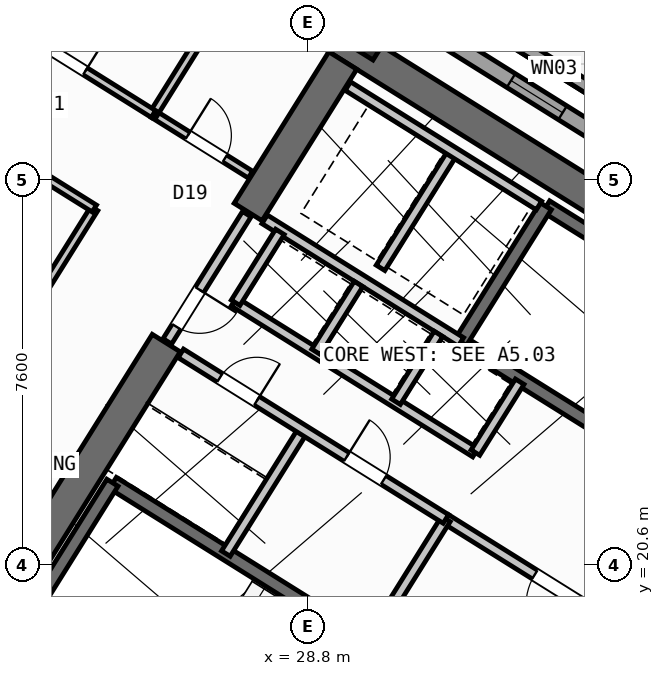
"""IFC4 building model, lengths in metres.
Left out: names, types, materials, properties, quantities, classifications, styles, units other than length and angle.
Written with IfcOpenShell. Run it as: python <this file> out.ifc"""

import sys

from ifc_helpers import new_model, si_unit, direction, frame, frame_2d, origin, origin_2d, place, context, subcontext, project, spatial, rectangle, hollow_rectangle, extrude, source, transform, mapped, element, fill, save


model = new_model("IFC4")
c1 = context("Model", 3, precision=1e-05, world=origin(), true_north=direction((0.0, 1.0)))
c2 = subcontext(c1, "Body", "Model", "MODEL_VIEW")
j1 = project(units=[si_unit("LENGTHUNIT", "METRE"), si_unit("PLANEANGLEUNIT", "RADIAN")], contexts=[c1])
p1 = place(None, origin())
s1 = spatial("IfcSite", under=j1, at=p1, CompositionType="ELEMENT")
p2 = place(p1, origin())
s2 = spatial("IfcBuilding", under=s1, at=p2, CompositionType="ELEMENT")
p3 = place(p2, frame((0.0, 0.0, 24.0)))
s3 = spatial("IfcBuildingStorey", under=s2, at=p3, CompositionType="ELEMENT", Elevation=24.0)
p4 = place(p3, frame((40.615, 23.983, 0.0), z_axis=(0.0, 0.0, 1.0), x_axis=(-0.848045953968, 0.529922692436, 0.0)))
e1 = element("IfcWall", 1, at=p4, inside=s3, PredefinedType="SHEAR", context=c2, shape_type="SweptSolid", body=[
    extrude(rectangle(XDim=13.24, YDim=0.65, at=frame_2d((6.62, 0.0))), origin(), (0.0, 0.0, 1.0), 3.35),
])
p5 = place(p3, frame((29.491, 30.552, 0.0), z_axis=(0.0, 0.0, 1.0), x_axis=(-0.529893103397, -0.8480644427, 0.0)))
e2 = element("IfcWall", 2, at=p5, inside=s3, PredefinedType="SHEAR", context=c2, shape_type="SweptSolid", body=[
    extrude(rectangle(XDim=3.525, YDim=0.65, at=frame_2d((1.763, 0.0))), origin(), (0.0, 0.0, 1.0), 3.35),
])
p6 = place(p3, frame((26.007, 24.976, 0.0), z_axis=(0.0, 0.0, 1.0), x_axis=(-0.529916319127, -0.848049936456, 0.0)))
e3 = element("IfcWall", 3, at=p6, inside=s3, PredefinedType="SHEAR", context=c2, shape_type="SweptSolid", body=[
    extrude(rectangle(XDim=6.375, YDim=0.65, at=frame_2d((3.188, 0.0))), origin(), (0.0, 0.0, 1.0), 3.35),
])
m1 = source(origin(), c2, "Body", "SweptSolid", [
    extrude(hollow_rectangle(XDim=1.0, YDim=1.0, WallThickness=0.04, at=origin_2d()), origin(), (0.0, 0.0, 1.0), 3.6),
])
p7 = place(p3, frame((29.928, 31.251, 0.0), z_axis=(0.0, 0.0, 1.0), x_axis=(-0.848048096156, 0.529919264233, 0.0)))
e4 = element("IfcColumn", 4, at=p7, inside=s3, PredefinedType="COLUMN", context=c2, shape_type="MappedRepresentation", body=[
    mapped(m1, transform((0.0, 0.0, 0.0), scale=1.0)),
])
p8 = place(p3, frame((40.961, 25.878, 0.0), z_axis=(0.0, 0.0, 1.0), x_axis=(-0.848053997745, 0.5299098196, 0.0)))
e5 = element("IfcWall", 5, at=p8, inside=s3, PredefinedType="PARAPET", context=c2, shape_type="SweptSolid", body=[
    extrude(rectangle(XDim=11.574, YDim=0.24, at=frame_2d((5.787, 0.0))), origin(), (0.0, 0.0, 1.0), 1.15),
])
p9 = place(p3, frame((29.268, 6.429, 0.0), z_axis=(0.0, 0.0, 1.0), x_axis=(-0.848049971435, 0.529916263149, 0.0)))
e6 = element("IfcWall", 6, at=p9, inside=s3, PredefinedType="STANDARD", context=c2, shape_type="SweptSolid", body=[
    extrude(rectangle(XDim=31.588, YDim=0.32, at=frame_2d((15.794, 0.0))), origin(), (0.0, 0.0, 1.0), 3.35),
])
p10 = place(p9, frame((15.901, 0.0, 0.0)))
e7 = element("IfcOpeningElement", 7, at=p10, cuts=e6, PredefinedType="OPENING", context=c2, shape_type="SweptSolid", body=[
    extrude(rectangle(XDim=1.2, YDim=2.15, at=frame_2d((0.6, 1.075))), frame((0.0, 0.17, 0.0), z_axis=(0.0, -1.0, 0.0), x_axis=(1.0, 0.0, 0.0)), (0.0, 0.0, 1.0), 0.34),
])
p11 = place(p9, frame((2.806, 0.0, 0.8)))
e8 = element("IfcOpeningElement", 8, at=p11, cuts=e6, PredefinedType="OPENING", context=c2, shape_type="SweptSolid", body=[
    extrude(rectangle(XDim=2.1, YDim=1.55, at=frame_2d((1.05, 0.775))), frame((0.0, 0.17, 0.0), z_axis=(0.0, -1.0, 0.0), x_axis=(1.0, 0.0, 0.0)), (0.0, 0.0, 1.0), 0.34),
])
p12 = place(p9, frame((7.481, 0.0, 0.8)))
e9 = element("IfcOpeningElement", 9, at=p12, cuts=e6, PredefinedType="OPENING", context=c2, shape_type="SweptSolid", body=[
    extrude(rectangle(XDim=2.1, YDim=1.55, at=frame_2d((1.05, 0.775))), frame((0.0, 0.17, 0.0), z_axis=(0.0, -1.0, 0.0), x_axis=(1.0, 0.0, 0.0)), (0.0, 0.0, 1.0), 0.34),
])
p13 = place(p9, frame((28.654, 0.0, 0.95)))
e10 = element("IfcOpeningElement", 10, at=p13, cuts=e6, PredefinedType="OPENING", context=c2, shape_type="SweptSolid", body=[
    extrude(rectangle(XDim=1.2, YDim=1.4, at=frame_2d((0.6, 0.7))), frame((0.0, 0.17, 0.0), z_axis=(0.0, -1.0, 0.0), x_axis=(1.0, 0.0, 0.0)), (0.0, 0.0, 1.0), 0.34),
])
p14 = place(p9, frame((19.11, 0.0, 1.0)))
e11 = element("IfcOpeningElement", 11, at=p14, cuts=e6, PredefinedType="OPENING", context=c2, shape_type="SweptSolid", body=[
    extrude(rectangle(XDim=0.9, YDim=1.25, at=frame_2d((0.45, 0.625))), frame((0.0, 0.17, 0.0), z_axis=(0.0, -1.0, 0.0), x_axis=(1.0, 0.0, 0.0)), (0.0, 0.0, 1.0), 0.34),
])
p15 = place(p9, frame((21.226, 0.0, 1.0)))
e12 = element("IfcOpeningElement", 12, at=p15, cuts=e6, PredefinedType="OPENING", context=c2, shape_type="SweptSolid", body=[
    extrude(rectangle(XDim=0.9, YDim=1.25, at=frame_2d((0.45, 0.625))), frame((0.0, 0.17, 0.0), z_axis=(0.0, -1.0, 0.0), x_axis=(1.0, 0.0, 0.0)), (0.0, 0.0, 1.0), 0.34),
])
p16 = place(p9, frame((23.014, 0.0, 1.0)))
e13 = element("IfcOpeningElement", 13, at=p16, cuts=e6, PredefinedType="OPENING", context=c2, shape_type="SweptSolid", body=[
    extrude(rectangle(XDim=0.9, YDim=1.25, at=frame_2d((0.45, 0.625))), frame((0.0, 0.17, 0.0), z_axis=(0.0, -1.0, 0.0), x_axis=(1.0, 0.0, 0.0)), (0.0, 0.0, 1.0), 0.34),
])
p17 = place(p9, frame((24.802, 0.0, 1.0)))
e14 = element("IfcOpeningElement", 14, at=p17, cuts=e6, PredefinedType="OPENING", context=c2, shape_type="SweptSolid", body=[
    extrude(rectangle(XDim=0.9, YDim=1.25, at=frame_2d((0.45, 0.625))), frame((0.0, 0.17, 0.0), z_axis=(0.0, -1.0, 0.0), x_axis=(1.0, 0.0, 0.0)), (0.0, 0.0, 1.0), 0.34),
])
p18 = place(p9, frame((26.59, 0.0, 1.0)))
e15 = element("IfcOpeningElement", 15, at=p18, cuts=e6, PredefinedType="OPENING", context=c2, shape_type="SweptSolid", body=[
    extrude(rectangle(XDim=0.9, YDim=1.25, at=frame_2d((0.45, 0.625))), frame((0.0, 0.17, 0.0), z_axis=(0.0, -1.0, 0.0), x_axis=(1.0, 0.0, 0.0)), (0.0, 0.0, 1.0), 0.34),
])
p19 = place(p3, frame((14.138, 41.825, 0.0), z_axis=(0.0, 0.0, 1.0), x_axis=(0.848046498049, -0.529921821731, 0.0)))
e16 = element("IfcWall", 16, at=p19, inside=s3, PredefinedType="STANDARD", context=c2, shape_type="SweptSolid", body=[
    extrude(rectangle(XDim=31.588, YDim=0.32, at=frame_2d((15.794, 0.0))), origin(), (0.0, 0.0, 1.0), 3.35),
])
p20 = place(p19, frame((3.369, 0.0, 0.0)))
e17 = element("IfcOpeningElement", 17, at=p20, cuts=e16, PredefinedType="OPENING", context=c2, shape_type="SweptSolid", body=[
    extrude(rectangle(XDim=1.05, YDim=2.15, at=frame_2d((0.525, 1.075))), frame((0.0, 0.17, 0.0), z_axis=(0.0, -1.0, 0.0), x_axis=(1.0, 0.0, 0.0)), (0.0, 0.0, 1.0), 0.34),
])
p21 = place(p19, frame((0.946, 0.0, 0.85)))
e18 = element("IfcOpeningElement", 18, at=p21, cuts=e16, PredefinedType="OPENING", context=c2, shape_type="SweptSolid", body=[
    extrude(rectangle(XDim=1.8, YDim=1.5, at=frame_2d((0.9, 0.75))), frame((0.0, 0.17, 0.0), z_axis=(0.0, -1.0, 0.0), x_axis=(1.0, 0.0, 0.0)), (0.0, 0.0, 1.0), 0.34),
])
p22 = place(p19, frame((8.46, 0.0, 0.85)))
e19 = element("IfcOpeningElement", 19, at=p22, cuts=e16, PredefinedType="OPENING", context=c2, shape_type="SweptSolid", body=[
    extrude(rectangle(XDim=1.8, YDim=1.5, at=frame_2d((0.9, 0.75))), frame((0.0, 0.17, 0.0), z_axis=(0.0, -1.0, 0.0), x_axis=(1.0, 0.0, 0.0)), (0.0, 0.0, 1.0), 0.34),
])
p23 = place(p19, frame((13.899, 0.0, 0.85)))
e20 = element("IfcOpeningElement", 20, at=p23, cuts=e16, PredefinedType="OPENING", context=c2, shape_type="SweptSolid", body=[
    extrude(rectangle(XDim=1.5, YDim=1.5, at=frame_2d((0.75, 0.75))), frame((0.0, 0.17, 0.0), z_axis=(0.0, -1.0, 0.0), x_axis=(1.0, 0.0, 0.0)), (0.0, 0.0, 1.0), 0.34),
])
p24 = place(p19, frame((22.019, 0.0, 0.95)))
e21 = element("IfcOpeningElement", 21, at=p24, cuts=e16, PredefinedType="OPENING", context=c2, shape_type="SweptSolid", body=[
    extrude(rectangle(XDim=1.2, YDim=1.4, at=frame_2d((0.6, 0.7))), frame((0.0, 0.17, 0.0), z_axis=(0.0, -1.0, 0.0), x_axis=(1.0, 0.0, 0.0)), (0.0, 0.0, 1.0), 0.34),
])
p25 = place(p19, frame((27.569, 0.0, 0.95)))
e22 = element("IfcOpeningElement", 22, at=p25, cuts=e16, PredefinedType="OPENING", context=c2, shape_type="SweptSolid", body=[
    extrude(rectangle(XDim=1.2, YDim=1.4, at=frame_2d((0.6, 0.7))), frame((0.0, 0.17, 0.0), z_axis=(0.0, -1.0, 0.0), x_axis=(1.0, 0.0, 0.0)), (0.0, 0.0, 1.0), 0.34),
])
p26 = place(p3, frame((31.28, 18.261, 0.0), z_axis=(0.0, 0.0, 1.0), x_axis=(-0.848051618787, 0.529913626805, 0.0)))
e23 = element("IfcWall", 23, at=p26, inside=s3, PredefinedType="SHEAR", context=c2, shape_type="SweptSolid", body=[
    extrude(rectangle(XDim=7.46, YDim=0.26, at=frame_2d((3.73, 0.0))), origin(), (0.0, 0.0, 1.0), 3.35),
])
p27 = place(p26, frame((0.36, 0.0, 0.0)))
e24 = element("IfcOpeningElement", 24, at=p27, cuts=e23, PredefinedType="OPENING", context=c2, shape_type="SweptSolid", body=[
    extrude(rectangle(XDim=0.86, YDim=2.05, at=frame_2d((0.43, 1.025))), frame((0.0, 0.14, 0.0), z_axis=(0.0, -1.0, 0.0), x_axis=(1.0, 0.0, 0.0)), (0.0, 0.0, 1.0), 0.28),
])
p28 = place(p3, frame((24.945, 22.22, 0.0), z_axis=(0.0, 0.0, 1.0), x_axis=(-0.529908658664, -0.84805472316, 0.0)))
e25 = element("IfcWall", 25, at=p28, inside=s3, PredefinedType="SHEAR", context=c2, shape_type="SweptSolid", body=[
    extrude(rectangle(XDim=3.16, YDim=0.26, at=frame_2d((1.58, 0.0))), origin(), (0.0, 0.0, 1.0), 3.35),
])
p29 = place(p3, frame((39.721, 23.788, 0.0), z_axis=(0.0, 0.0, 1.0), x_axis=(-0.848054434086, 0.529909121291, 0.0)))
e26 = element("IfcWall", 26, at=p29, inside=s3, PredefinedType="SHEAR", context=c2, shape_type="SweptSolid", body=[
    extrude(rectangle(XDim=7.33, YDim=0.26, at=frame_2d((3.665, 0.0))), origin(), (0.0, 0.0, 1.0), 3.35),
])
p30 = place(p3, frame((38.046, 21.108, 0.0), z_axis=(0.0, 0.0, 1.0), x_axis=(-0.848054434086, 0.529909121291, 0.0)))
e27 = element("IfcWall", 27, at=p30, inside=s3, PredefinedType="SHEAR", context=c2, shape_type="SweptSolid", body=[
    extrude(rectangle(XDim=7.33, YDim=0.26, at=frame_2d((3.665, 0.0))), origin(), (0.0, 0.0, 1.0), 3.35),
])
p31 = place(p30, frame((0.22, 0.0, 0.0)))
e28 = element("IfcOpeningElement", 28, at=p31, cuts=e27, PredefinedType="OPENING", context=c2, shape_type="SweptSolid", body=[
    extrude(rectangle(XDim=1.1, YDim=2.1, at=frame_2d((0.55, 1.05))), frame((0.0, 0.14, 0.0), z_axis=(0.0, -1.0, 0.0), x_axis=(1.0, 0.0, 0.0)), (0.0, 0.0, 1.0), 0.28),
])
p32 = place(p3, frame((33.496, 27.677, 0.0), z_axis=(0.0, 0.0, 1.0), x_axis=(-0.529908658664, -0.84805472316, 0.0)))
e29 = element("IfcWall", 29, at=p32, inside=s3, PredefinedType="SHEAR", context=c2, shape_type="SweptSolid", body=[
    extrude(rectangle(XDim=3.16, YDim=0.26, at=frame_2d((1.58, 0.0))), origin(), (0.0, 0.0, 1.0), 3.35),
])
p33 = place(p3, frame((36.374, 18.474, 0.0), z_axis=(0.0, 0.0, 1.0), x_axis=(-0.848051071577, 0.529914502535, 0.0)))
e30 = element("IfcWall", 30, at=p33, inside=s3, PredefinedType="STANDARD", context=c2, shape_type="SweptSolid", body=[
    extrude(rectangle(XDim=5.718, YDim=0.2, at=frame_2d((2.859, 0.0))), origin(), (0.0, 0.0, 1.0), 3.34),
])
p34 = place(p33, frame((2.498, 0.0, 0.0)))
e31 = element("IfcOpeningElement", 31, at=p34, cuts=e30, PredefinedType="OPENING", context=c2, shape_type="SweptSolid", body=[
    extrude(rectangle(XDim=1.15, YDim=2.1, at=frame_2d((0.575, 1.05))), frame((0.0, 0.11, 0.0), z_axis=(0.0, -1.0, 0.0), x_axis=(1.0, 0.0, 0.0)), (0.0, 0.0, 1.0), 0.22),
])
p35 = place(p3, frame((31.822, 24.998, 0.0), z_axis=(0.0, 0.0, 1.0), x_axis=(-0.848058348634, 0.529902856485, 0.0)))
e32 = element("IfcWall", 32, at=p35, inside=s3, PredefinedType="STANDARD", context=c2, shape_type="SweptSolid", body=[
    extrude(rectangle(XDim=4.568, YDim=0.2, at=frame_2d((2.284, 0.0))), origin(), (0.0, 0.0, 1.0), 3.34),
])
p36 = place(p3, frame((32.108, 22.814, 0.0), z_axis=(0.0, 0.0, 1.0), x_axis=(-0.848042229521, 0.529928652696, 0.0)))
e33 = element("IfcWall", 33, at=p36, inside=s3, PredefinedType="STANDARD", context=c2, shape_type="SweptSolid", body=[
    extrude(rectangle(XDim=5.62, YDim=0.2, at=frame_2d((2.81, 0.0))), origin(), (0.0, 0.0, 1.0), 3.34),
])
p37 = place(p3, frame((32.982, 24.213, 0.0), z_axis=(0.0, 0.0, 1.0), x_axis=(-0.529839334948, -0.84809803628, 0.0)))
e34 = element("IfcWall", 34, at=p37, inside=s3, PredefinedType="STANDARD", context=c2, shape_type="SweptSolid", body=[
    extrude(rectangle(XDim=1.65, YDim=0.2, at=frame_2d((0.825, 0.0))), origin(), (0.0, 0.0, 1.0), 3.34),
])
p38 = place(p3, frame((28.25, 27.17, 0.0), z_axis=(0.0, 0.0, 1.0), x_axis=(-0.529905827651, -0.848056492117, 0.0)))
e35 = element("IfcWall", 35, at=p38, inside=s3, PredefinedType="STANDARD", context=c2, shape_type="SweptSolid", body=[
    extrude(rectangle(XDim=1.65, YDim=0.2, at=frame_2d((0.825, 0.0))), origin(), (0.0, 0.0, 1.0), 3.34),
])
p39 = place(p3, frame((31.645, 28.716, 0.0), z_axis=(0.0, 0.0, 1.0), x_axis=(-0.52986693015, -0.848080795876, 0.0)))
e36 = element("IfcWall", 36, at=p39, inside=s3, PredefinedType="STANDARD", context=c2, shape_type="SweptSolid", body=[
    extrude(rectangle(XDim=2.66, YDim=0.2, at=frame_2d((1.33, 0.0))), origin(), (0.0, 0.0, 1.0), 3.34),
])
p40 = place(p3, frame((33.363, 27.69, 0.0), z_axis=(0.0, 0.0, 1.0), x_axis=(-0.848053806312, 0.529910125964, 0.0)))
e37 = element("IfcWall", 37, at=p40, inside=s3, PredefinedType="STANDARD", context=c2, shape_type="SweptSolid", body=[
    extrude(rectangle(XDim=4.448, YDim=0.2, at=frame_2d((2.224, 0.0))), origin(), (0.0, 0.0, 1.0), 3.34),
])
for number, where, z_axis, x_axis in (
    (38, (31.379, 25.156, 0.0), (0.0, 0.0, 1.0), (-0.53, -0.848, 0.0)),
    (39, (29.801, 26.142, 0.0), (0.0, 0.0, 1.0), (-0.53, -0.848, 0.0)),
):
    element("IfcWall", number, at=place(p3, frame(where, z_axis=z_axis, x_axis=x_axis)), inside=s3, PredefinedType="STANDARD", context=c2, shape_type="SweptSolid", body=[
        extrude(rectangle(XDim=1.58, YDim=0.2, at=frame_2d((0.79, 0.0))), origin(), (0.0, 0.0, 1.0), 3.34),
    ])
for number, where, z_axis, x_axis in (
    (40, (31.525, 21.504, 0.0), (0.0, 0.0, 1.0), (-0.53, -0.848, 0.0)),
    (41, (28.71, 23.263, 0.0), (0.0, 0.0, 1.0), (-0.53, -0.848, 0.0)),
):
    element("IfcWall", number, at=place(p3, frame(where, z_axis=z_axis, x_axis=x_axis)), inside=s3, PredefinedType="STANDARD", context=c2, shape_type="SweptSolid", body=[
        extrude(rectangle(XDim=2.88, YDim=0.2, at=frame_2d((1.44, 0.0))), origin(), (0.0, 0.0, 1.0), 3.34),
    ])
p41 = place(p3, frame((31.525, 21.504, 0.0), z_axis=(0.0, 0.0, 1.0), x_axis=(-0.848044998614, 0.529924221305, 0.0)))
e42 = element("IfcWall", 42, at=p41, inside=s3, PredefinedType="STANDARD", context=c2, shape_type="SweptSolid", body=[
    extrude(rectangle(XDim=6.168, YDim=0.2, at=frame_2d((3.084, 0.0))), origin(), (0.0, 0.0, 1.0), 3.34),
])
p42 = place(p41, frame((4.4, 0.0, 0.0)))
e43 = element("IfcOpeningElement", 43, at=p42, cuts=e42, PredefinedType="OPENING", context=c2, shape_type="SweptSolid", body=[
    extrude(rectangle(XDim=0.86, YDim=2.05, at=frame_2d((0.43, 1.025))), frame((0.0, 0.11, 0.0), z_axis=(0.0, -1.0, 0.0), x_axis=(1.0, 0.0, 0.0)), (0.0, 0.0, 1.0), 0.22),
])
p43 = place(p41, frame((1.45, 0.0, 0.0)))
e44 = element("IfcOpeningElement", 44, at=p43, cuts=e42, PredefinedType="OPENING", context=c2, shape_type="SweptSolid", body=[
    extrude(rectangle(XDim=0.86, YDim=2.05, at=frame_2d((0.43, 1.025))), frame((0.0, 0.11, 0.0), z_axis=(0.0, -1.0, 0.0), x_axis=(1.0, 0.0, 0.0)), (0.0, 0.0, 1.0), 0.22),
])
p44 = place(p3, frame((27.596, 27.52, 0.0), z_axis=(0.0, 0.0, 1.0), x_axis=(-0.529865479138, -0.848081702443, 0.0)))
e45 = element("IfcWall", 45, at=p44, inside=s3, PredefinedType="STANDARD", context=c2, shape_type="SweptSolid", body=[
    extrude(rectangle(XDim=2.96, YDim=0.2, at=frame_2d((1.48, 0.0))), origin(), (0.0, 0.0, 1.0), 3.34),
])
p45 = place(p44, frame((1.76, 0.0, 0.0)))
e46 = element("IfcOpeningElement", 46, at=p45, cuts=e45, PredefinedType="OPENING", context=c2, shape_type="SweptSolid", body=[
    extrude(rectangle(XDim=0.86, YDim=2.05, at=frame_2d((0.43, 1.025))), frame((0.0, 0.11, 0.0), z_axis=(0.0, -1.0, 0.0), x_axis=(1.0, 0.0, 0.0)), (0.0, 0.0, 1.0), 0.22),
])
p46 = place(p3, frame((27.669, 28.3, 0.0), z_axis=(0.0, 0.0, 1.0), x_axis=(-0.848040823168, 0.52993090327, 0.0)))
e47 = element("IfcWall", 47, at=p46, inside=s3, PredefinedType="PARTITIONING", context=c2, shape_type="SweptSolid", body=[
    extrude(rectangle(XDim=2.258, YDim=0.16, at=frame_2d((1.129, 0.0))), origin(), (0.0, 0.0, 1.0), 3.34),
])
p47 = place(p46, frame((0.598, 0.0, 0.0)))
e48 = element("IfcOpeningElement", 48, at=p47, cuts=e47, PredefinedType="OPENING", context=c2, shape_type="SweptSolid", body=[
    extrude(rectangle(XDim=0.86, YDim=2.05, at=frame_2d((0.43, 1.025))), frame((0.0, 0.09, 0.0), z_axis=(0.0, -1.0, 0.0), x_axis=(1.0, 0.0, 0.0)), (0.0, 0.0, 1.0), 0.18),
])
p48 = place(p3, frame((27.953, 33.016, 0.0), z_axis=(0.0, 0.0, 1.0), x_axis=(-0.529872022255, -0.848077614391, 0.0)))
e49 = element("IfcWall", 49, at=p48, inside=s3, PredefinedType="PARTITIONING", context=c2, shape_type="SweptSolid", body=[
    extrude(rectangle(XDim=4.15, YDim=0.16, at=frame_2d((2.075, 0.0))), origin(), (0.0, 0.0, 1.0), 3.34),
])
p49 = place(p3, frame((24.588, 27.631, 0.0), z_axis=(0.0, 0.0, 1.0), x_axis=(-0.529914586043, -0.848051019396, 0.0)))
e50 = element("IfcWall", 50, at=p49, inside=s3, PredefinedType="PARTITIONING", context=c2, shape_type="SweptSolid", body=[
    extrude(rectangle(XDim=15.35, YDim=0.16, at=frame_2d((7.675, 0.0))), origin(), (0.0, 0.0, 1.0), 3.34),
])
p50 = place(p3, frame((25.754, 29.497, 0.0), z_axis=(0.0, 0.0, 1.0), x_axis=(-0.848045850158, 0.529922858565, 0.0)))
e51 = element("IfcWall", 51, at=p50, inside=s3, PredefinedType="PARTITIONING", context=c2, shape_type="SweptSolid", body=[
    extrude(rectangle(XDim=16.73, YDim=0.16, at=frame_2d((8.365, 0.0))), origin(), (0.0, 0.0, 1.0), 3.34),
])
p51 = place(p50, frame((1.588, 0.0, 0.0)))
e52 = element("IfcOpeningElement", 52, at=p51, cuts=e51, PredefinedType="OPENING", context=c2, shape_type="SweptSolid", body=[
    extrude(rectangle(XDim=1.0, YDim=2.1, at=frame_2d((0.5, 1.05))), frame((0.0, 0.09, 0.0), z_axis=(0.0, -1.0, 0.0), x_axis=(1.0, 0.0, 0.0)), (0.0, 0.0, 1.0), 0.18),
])
p52 = place(p50, frame((6.685, 0.0, 0.0)))
e53 = element("IfcOpeningElement", 53, at=p52, cuts=e51, PredefinedType="OPENING", context=c2, shape_type="SweptSolid", body=[
    extrude(rectangle(XDim=1.0, YDim=2.1, at=frame_2d((0.5, 1.05))), frame((0.0, 0.09, 0.0), z_axis=(0.0, -1.0, 0.0), x_axis=(1.0, 0.0, 0.0)), (0.0, 0.0, 1.0), 0.18),
])
p53 = place(p50, frame((12.951, 0.0, 0.0)))
e54 = element("IfcOpeningElement", 54, at=p53, cuts=e51, PredefinedType="OPENING", context=c2, shape_type="SweptSolid", body=[
    extrude(rectangle(XDim=1.0, YDim=2.1, at=frame_2d((0.5, 1.05))), frame((0.0, 0.09, 0.0), z_axis=(0.0, -1.0, 0.0), x_axis=(1.0, 0.0, 0.0)), (0.0, 0.0, 1.0), 0.18),
])
p54 = place(p3, frame((24.588, 27.631, 0.0), z_axis=(0.0, 0.0, 1.0), x_axis=(-0.848041752158, 0.529929416617, 0.0)))
e55 = element("IfcWall", 55, at=p54, inside=s3, PredefinedType="PARTITIONING", context=c2, shape_type="SweptSolid", body=[
    extrude(rectangle(XDim=16.73, YDim=0.16, at=frame_2d((8.365, 0.0))), origin(), (0.0, 0.0, 1.0), 3.34),
])
p55 = place(p54, frame((2.22, 0.0, 0.0)))
e56 = element("IfcOpeningElement", 56, at=p55, cuts=e55, PredefinedType="OPENING", context=c2, shape_type="SweptSolid", body=[
    extrude(rectangle(XDim=0.86, YDim=2.05, at=frame_2d((0.43, 1.025))), frame((0.0, 0.09, 0.0), z_axis=(0.0, -1.0, 0.0), x_axis=(1.0, 0.0, 0.0)), (0.0, 0.0, 1.0), 0.18),
])
p56 = place(p54, frame((14.22, 0.0, 0.0)))
e57 = element("IfcOpeningElement", 57, at=p56, cuts=e55, PredefinedType="OPENING", context=c2, shape_type="SweptSolid", body=[
    extrude(rectangle(XDim=1.0, YDim=2.1, at=frame_2d((0.5, 1.05))), frame((0.0, 0.09, 0.0), z_axis=(0.0, -1.0, 0.0), x_axis=(1.0, 0.0, 0.0)), (0.0, 0.0, 1.0), 0.18),
])
m2 = source(origin(), c2, "Body", "SweptSolid", [
    extrude(rectangle(XDim=1.2, YDim=1.4, at=frame_2d((0.6, 0.7))), frame((0.0, 0.03, 0.0), z_axis=(0.0, -1.0, 0.0), x_axis=(1.0, 0.0, 0.0)), (0.0, 0.0, 1.0), 0.06),
])
p57 = place(p24, origin())
e58 = element("IfcWindow", 58, at=p57, inside=s3, PartitioningType="SINGLE_PANEL", PredefinedType="WINDOW", context=c2, shape_type="MappedRepresentation", body=[
    mapped(m2, transform((0.0, 0.0, 0.0), scale=1.0)),
])
fill(e21, e58)
m3 = source(origin(), c2, "Body", "SweptSolid", [
    extrude(rectangle(XDim=1.15, YDim=2.1, at=frame_2d((0.575, 1.05))), frame((0.0, 0.025, 0.0), z_axis=(0.0, -1.0, 0.0), x_axis=(1.0, 0.0, 0.0)), (0.0, 0.0, 1.0), 0.05),
])
p58 = place(p34, origin())
e59 = element("IfcDoor", 59, at=p58, inside=s3, OperationType="SINGLE_SWING_LEFT", PredefinedType="DOOR", context=c2, shape_type="MappedRepresentation", body=[
    mapped(m3, transform((0.0, 0.0, 0.0), scale=1.0)),
])
fill(e31, e59)
m4 = source(origin(), c2, "Body", "SweptSolid", [
    extrude(rectangle(XDim=0.86, YDim=2.05, at=frame_2d((0.43, 1.025))), frame((0.0, 0.025, 0.0), z_axis=(0.0, -1.0, 0.0), x_axis=(1.0, 0.0, 0.0)), (0.0, 0.0, 1.0), 0.05),
])
p59 = place(p42, frame((0.86, 0.0, 0.0), z_axis=(0.0, 0.0, 1.0), x_axis=(-1.0, 0.0, 0.0)))
e60 = element("IfcDoor", 60, at=p59, inside=s3, OperationType="SINGLE_SWING_RIGHT", PredefinedType="DOOR", context=c2, shape_type="MappedRepresentation", body=[
    mapped(m4, transform((0.0, 0.0, 0.0), scale=1.0)),
])
fill(e43, e60)
p60 = place(p43, frame((0.86, 0.0, 0.0), z_axis=(0.0, 0.0, 1.0), x_axis=(-1.0, 0.0, 0.0)))
e61 = element("IfcDoor", 61, at=p60, inside=s3, OperationType="SINGLE_SWING_LEFT", PredefinedType="DOOR", context=c2, shape_type="MappedRepresentation", body=[
    mapped(m4, transform((0.0, 0.0, 0.0), scale=1.0)),
])
fill(e44, e61)
p61 = place(p47, frame((0.86, 0.0, 0.0), z_axis=(0.0, 0.0, 1.0), x_axis=(-1.0, 0.0, 0.0)))
e62 = element("IfcDoor", 62, at=p61, inside=s3, OperationType="SINGLE_SWING_LEFT", PredefinedType="DOOR", context=c2, shape_type="MappedRepresentation", body=[
    mapped(m4, transform((0.0, 0.0, 0.0), scale=1.0)),
])
fill(e48, e62)
p62 = place(p45, origin())
e63 = element("IfcDoor", 63, at=p62, inside=s3, OperationType="SINGLE_SWING_LEFT", PredefinedType="DOOR", context=c2, shape_type="MappedRepresentation", body=[
    mapped(m4, transform((0.0, 0.0, 0.0), scale=1.0)),
])
fill(e46, e63)
m5 = source(origin(), c2, "Body", "SweptSolid", [
    extrude(rectangle(XDim=1.0, YDim=2.1, at=frame_2d((0.5, 1.05))), frame((0.0, 0.025, 0.0), z_axis=(0.0, -1.0, 0.0), x_axis=(1.0, 0.0, 0.0)), (0.0, 0.0, 1.0), 0.05),
])
p63 = place(p51, frame((1.0, 0.0, 0.0), z_axis=(0.0, 0.0, 1.0), x_axis=(-1.0, 0.0, 0.0)))
e64 = element("IfcDoor", 64, at=p63, inside=s3, OperationType="SINGLE_SWING_RIGHT", PredefinedType="DOOR", context=c2, shape_type="MappedRepresentation", body=[
    mapped(m5, transform((0.0, 0.0, 0.0), scale=1.0)),
])
fill(e52, e64)
save(model, sys.argv[1])
